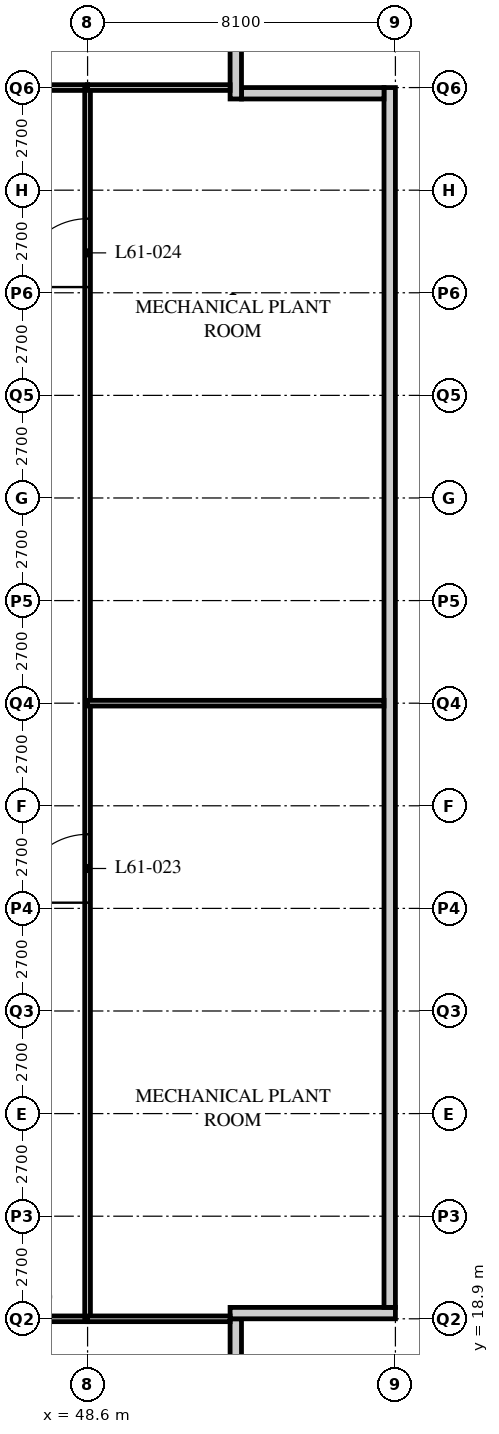
"""IFC4 building model, lengths in metres.
Left out: names, types, materials, properties, quantities, classifications, styles, units other than length and angle.
Written with IfcOpenShell. Run it as: python <this file> out.ifc"""

import sys

from ifc_helpers import new_model, si_unit, direction, frame, frame_2d, origin, place, context, subcontext, project, spatial, rectangle, extrude, element, fill, save


model = new_model("IFC4")
c1 = context("Model", 3, precision=1e-05, world=origin(), true_north=direction((0.0, 1.0)))
c2 = subcontext(c1, "Body", "Model", "MODEL_VIEW")
j1 = project(units=[si_unit("LENGTHUNIT", "METRE"), si_unit("PLANEANGLEUNIT", "RADIAN")], contexts=[c1])
p1 = place(None, origin())
s1 = spatial("IfcSite", under=j1, at=p1, CompositionType="ELEMENT")
p2 = place(p1, origin())
s2 = spatial("IfcBuilding", under=s1, at=p2, CompositionType="ELEMENT")
p3 = place(p2, frame((0.0, 0.0, 235.2)))
s3 = spatial("IfcBuildingStorey", under=s2, at=p3, CompositionType="ELEMENT", Elevation=235.2)
p4 = place(p3, frame((52.5, 15.15, 0.0), z_axis=(0.0, 0.0, 1.0), x_axis=(0.0, 1.0, 0.0)))
e1 = element("IfcWall", 1, at=p4, inside=s3, PredefinedType="SOLIDWALL", context=c2, shape_type="SweptSolid", body=[
    extrude(rectangle(XDim=3.75, YDim=0.3, at=frame_2d((1.875, 0.0))), origin(), (0.0, 0.0, 1.0), 6.25),
])
p5 = place(p3, frame((52.35, 19.05, 0.0), z_axis=(0.0, 0.0, 1.0), x_axis=(1.0, 0.0, 0.0)))
e2 = element("IfcWall", 2, at=p5, inside=s3, PredefinedType="SOLIDWALL", context=c2, shape_type="SweptSolid", body=[
    extrude(rectangle(XDim=4.35, YDim=0.3, at=frame_2d((2.175, 0.0))), origin(), (0.0, 0.0, 1.0), 5.95),
])
p6 = place(p3, frame((56.55, 19.2, 0.0), z_axis=(0.0, 0.0, 1.0), x_axis=(0.0, 1.0, 0.0)))
e3 = element("IfcWall", 3, at=p6, inside=s3, PredefinedType="SOLIDWALL", context=c2, shape_type="SweptSolid", body=[
    extrude(rectangle(XDim=32.1, YDim=0.3, at=frame_2d((16.05, 0.0))), origin(), (0.0, 0.0, 1.0), 5.95),
])
p7 = place(p3, frame((56.4, 51.15, 0.0), z_axis=(0.0, 0.0, 1.0), x_axis=(-1.0, 0.0, 0.0)))
e4 = element("IfcWall", 4, at=p7, inside=s3, PredefinedType="SOLIDWALL", context=c2, shape_type="SweptSolid", body=[
    extrude(rectangle(XDim=3.75, YDim=0.3, at=frame_2d((1.875, 0.0))), origin(), (0.0, 0.0, 1.0), 6.95),
])
p8 = place(p3, frame((52.5, 51.0, 0.0), z_axis=(0.0, 0.0, 1.0), x_axis=(0.0, 1.0, 0.0)))
e5 = element("IfcWall", 5, at=p8, inside=s3, PredefinedType="SOLIDWALL", context=c2, shape_type="SweptSolid", body=[
    extrude(rectangle(XDim=4.35, YDim=0.3, at=frame_2d((2.175, 0.0))), origin(), (0.0, 0.0, 1.0), 6.95),
])
p9 = place(p3, frame((8.1, 18.9, 0.0), z_axis=(0.0, 0.0, 1.0), x_axis=(1.0, 0.0, 0.0)))
e6 = element("IfcWall", 6, at=p9, inside=s3, PredefinedType="PARTITIONING", context=c2, shape_type="SweptSolid", body=[
    extrude(rectangle(XDim=40.5, YDim=0.15, at=frame_2d((20.25, 0.0))), origin(), (0.0, 0.0, 1.0), 5.95),
])
p10 = place(p9, frame((11.25, 0.0, 0.0)))
e7 = element("IfcOpeningElement", 7, at=p10, cuts=e6, PredefinedType="OPENING", context=c2, shape_type="SweptSolid", body=[
    extrude(rectangle(XDim=1.8, YDim=2.4, at=frame_2d((0.9, 1.2))), frame((0.0, 0.085, 0.0), z_axis=(0.0, -1.0, 0.0), x_axis=(1.0, 0.0, 0.0)), (0.0, 0.0, 1.0), 0.17),
])
p11 = place(p9, frame((27.45, 0.0, 0.0)))
e8 = element("IfcOpeningElement", 8, at=p11, cuts=e6, PredefinedType="OPENING", context=c2, shape_type="SweptSolid", body=[
    extrude(rectangle(XDim=1.8, YDim=2.4, at=frame_2d((0.9, 1.2))), frame((0.0, 0.085, 0.0), z_axis=(0.0, -1.0, 0.0), x_axis=(1.0, 0.0, 0.0)), (0.0, 0.0, 1.0), 0.17),
])
p12 = place(p9, frame((1.275, 0.0, 0.0)))
e9 = element("IfcOpeningElement", 9, at=p12, cuts=e6, PredefinedType="OPENING", context=c2, shape_type="SweptSolid", body=[
    extrude(rectangle(XDim=1.0, YDim=2.1, at=frame_2d((0.5, 1.05))), frame((0.0, 0.085, 0.0), z_axis=(0.0, -1.0, 0.0), x_axis=(1.0, 0.0, 0.0)), (0.0, 0.0, 1.0), 0.17),
])
p13 = place(p9, frame((38.225, 0.0, 0.0)))
e10 = element("IfcOpeningElement", 10, at=p13, cuts=e6, PredefinedType="OPENING", context=c2, shape_type="SweptSolid", body=[
    extrude(rectangle(XDim=1.0, YDim=2.1, at=frame_2d((0.5, 1.05))), frame((0.0, 0.085, 0.0), z_axis=(0.0, -1.0, 0.0), x_axis=(1.0, 0.0, 0.0)), (0.0, 0.0, 1.0), 0.17),
])
p14 = place(p3, frame((8.1, 51.3, 0.0), z_axis=(0.0, 0.0, 1.0), x_axis=(1.0, 0.0, 0.0)))
e11 = element("IfcWall", 11, at=p14, inside=s3, PredefinedType="PARTITIONING", context=c2, shape_type="SweptSolid", body=[
    extrude(rectangle(XDim=40.5, YDim=0.15, at=frame_2d((20.25, 0.0))), origin(), (0.0, 0.0, 1.0), 6.95),
])
p15 = place(p14, frame((8.45, 0.0, 0.0)))
e12 = element("IfcOpeningElement", 12, at=p15, cuts=e11, PredefinedType="OPENING", context=c2, shape_type="SweptSolid", body=[
    extrude(rectangle(XDim=1.8, YDim=2.4, at=frame_2d((0.9, 1.2))), frame((0.0, 0.085, 0.0), z_axis=(0.0, -1.0, 0.0), x_axis=(1.0, 0.0, 0.0)), (0.0, 0.0, 1.0), 0.17),
])
p16 = place(p14, frame((19.35, 0.0, 0.0)))
e13 = element("IfcOpeningElement", 13, at=p16, cuts=e11, PredefinedType="OPENING", context=c2, shape_type="SweptSolid", body=[
    extrude(rectangle(XDim=1.8, YDim=2.4, at=frame_2d((0.9, 1.2))), frame((0.0, 0.085, 0.0), z_axis=(0.0, -1.0, 0.0), x_axis=(1.0, 0.0, 0.0)), (0.0, 0.0, 1.0), 0.17),
])
p17 = place(p14, frame((33.0, 0.0, 0.0)))
e14 = element("IfcOpeningElement", 14, at=p17, cuts=e11, PredefinedType="OPENING", context=c2, shape_type="SweptSolid", body=[
    extrude(rectangle(XDim=1.8, YDim=2.4, at=frame_2d((0.9, 1.2))), frame((0.0, 0.085, 0.0), z_axis=(0.0, -1.0, 0.0), x_axis=(1.0, 0.0, 0.0)), (0.0, 0.0, 1.0), 0.17),
])
p18 = place(p14, frame((37.975, 0.0, 0.0)))
e15 = element("IfcOpeningElement", 15, at=p18, cuts=e11, PredefinedType="OPENING", context=c2, shape_type="SweptSolid", body=[
    extrude(rectangle(XDim=1.0, YDim=2.1, at=frame_2d((0.5, 1.05))), frame((0.0, 0.085, 0.0), z_axis=(0.0, -1.0, 0.0), x_axis=(1.0, 0.0, 0.0)), (0.0, 0.0, 1.0), 0.17),
])
p19 = place(p14, frame((1.525, 0.0, 0.0)))
e16 = element("IfcOpeningElement", 16, at=p19, cuts=e11, PredefinedType="OPENING", context=c2, shape_type="SweptSolid", body=[
    extrude(rectangle(XDim=1.0, YDim=2.1, at=frame_2d((0.5, 1.05))), frame((0.0, 0.085, 0.0), z_axis=(0.0, -1.0, 0.0), x_axis=(1.0, 0.0, 0.0)), (0.0, 0.0, 1.0), 0.17),
])
p20 = place(p3, frame((48.6, 18.9, 0.0), z_axis=(0.0, 0.0, 1.0), x_axis=(0.0, 1.0, 0.0)))
e17 = element("IfcWall", 17, at=p20, inside=s3, PredefinedType="PARTITIONING", context=c2, shape_type="SweptSolid", body=[
    extrude(rectangle(XDim=32.4, YDim=0.15, at=frame_2d((16.2, 0.0))), origin(), (0.0, 0.0, 1.0), 5.95),
])
p21 = place(p20, frame((10.95, 0.0, 0.0)))
e18 = element("IfcOpeningElement", 18, at=p21, cuts=e17, PredefinedType="OPENING", context=c2, shape_type="SweptSolid", body=[
    extrude(rectangle(XDim=1.8, YDim=2.4, at=frame_2d((0.9, 1.2))), frame((0.0, 0.085, 0.0), z_axis=(0.0, -1.0, 0.0), x_axis=(1.0, 0.0, 0.0)), (0.0, 0.0, 1.0), 0.17),
])
p22 = place(p20, frame((27.15, 0.0, 0.0)))
e19 = element("IfcOpeningElement", 19, at=p22, cuts=e17, PredefinedType="OPENING", context=c2, shape_type="SweptSolid", body=[
    extrude(rectangle(XDim=1.8, YDim=2.4, at=frame_2d((0.9, 1.2))), frame((0.0, 0.085, 0.0), z_axis=(0.0, -1.0, 0.0), x_axis=(1.0, 0.0, 0.0)), (0.0, 0.0, 1.0), 0.17),
])
p23 = place(p3, frame((48.6, 35.1, 0.0), z_axis=(0.0, 0.0, 1.0), x_axis=(1.0, 0.0, 0.0)))
e20 = element("IfcWall", 20, at=p23, inside=s3, PredefinedType="PARTITIONING", context=c2, shape_type="SweptSolid", body=[
    extrude(rectangle(XDim=7.8, YDim=0.15, at=frame_2d((3.9, 0.0))), origin(), (0.0, 0.0, 1.0), 6.95),
])
p24 = place(p3, frame((48.6, 18.9, 0.0), z_axis=(0.0, 0.0, 1.0), x_axis=(1.0, 0.0, 0.0)))
e21 = element("IfcWall", 21, at=p24, inside=s3, PredefinedType="PARTITIONING", context=c2, shape_type="SweptSolid", body=[
    extrude(rectangle(XDim=3.75, YDim=0.15, at=frame_2d((1.875, 0.0))), origin(), (0.0, 0.0, 1.0), 5.95),
])
p25 = place(p3, frame((48.6, 51.3, 0.0), z_axis=(0.0, 0.0, 1.0), x_axis=(1.0, 0.0, 0.0)))
e22 = element("IfcWall", 22, at=p25, inside=s3, PredefinedType="PARTITIONING", context=c2, shape_type="SweptSolid", body=[
    extrude(rectangle(XDim=3.75, YDim=0.15, at=frame_2d((1.875, 0.0))), origin(), (0.0, 0.0, 1.0), 6.95),
])
p26 = place(p21, origin())
e23 = element("IfcDoor", 23, at=p26, inside=s3, OperationType="DOUBLE_DOOR_SINGLE_SWING", PredefinedType="DOOR", context=c2, shape_type="SweptSolid", body=[
    extrude(rectangle(XDim=1.8, YDim=2.4, at=frame_2d((0.9, 1.2))), frame((0.0, 0.025, 0.0), z_axis=(0.0, -1.0, 0.0), x_axis=(1.0, 0.0, 0.0)), (0.0, 0.0, 1.0), 0.05),
])
fill(e18, e23)
p27 = place(p22, origin())
e24 = element("IfcDoor", 24, at=p27, inside=s3, OperationType="DOUBLE_DOOR_SINGLE_SWING", PredefinedType="DOOR", context=c2, shape_type="SweptSolid", body=[
    extrude(rectangle(XDim=1.8, YDim=2.4, at=frame_2d((0.9, 1.2))), frame((0.0, 0.025, 0.0), z_axis=(0.0, -1.0, 0.0), x_axis=(1.0, 0.0, 0.0)), (0.0, 0.0, 1.0), 0.05),
])
fill(e19, e24)
save(model, sys.argv[1])
